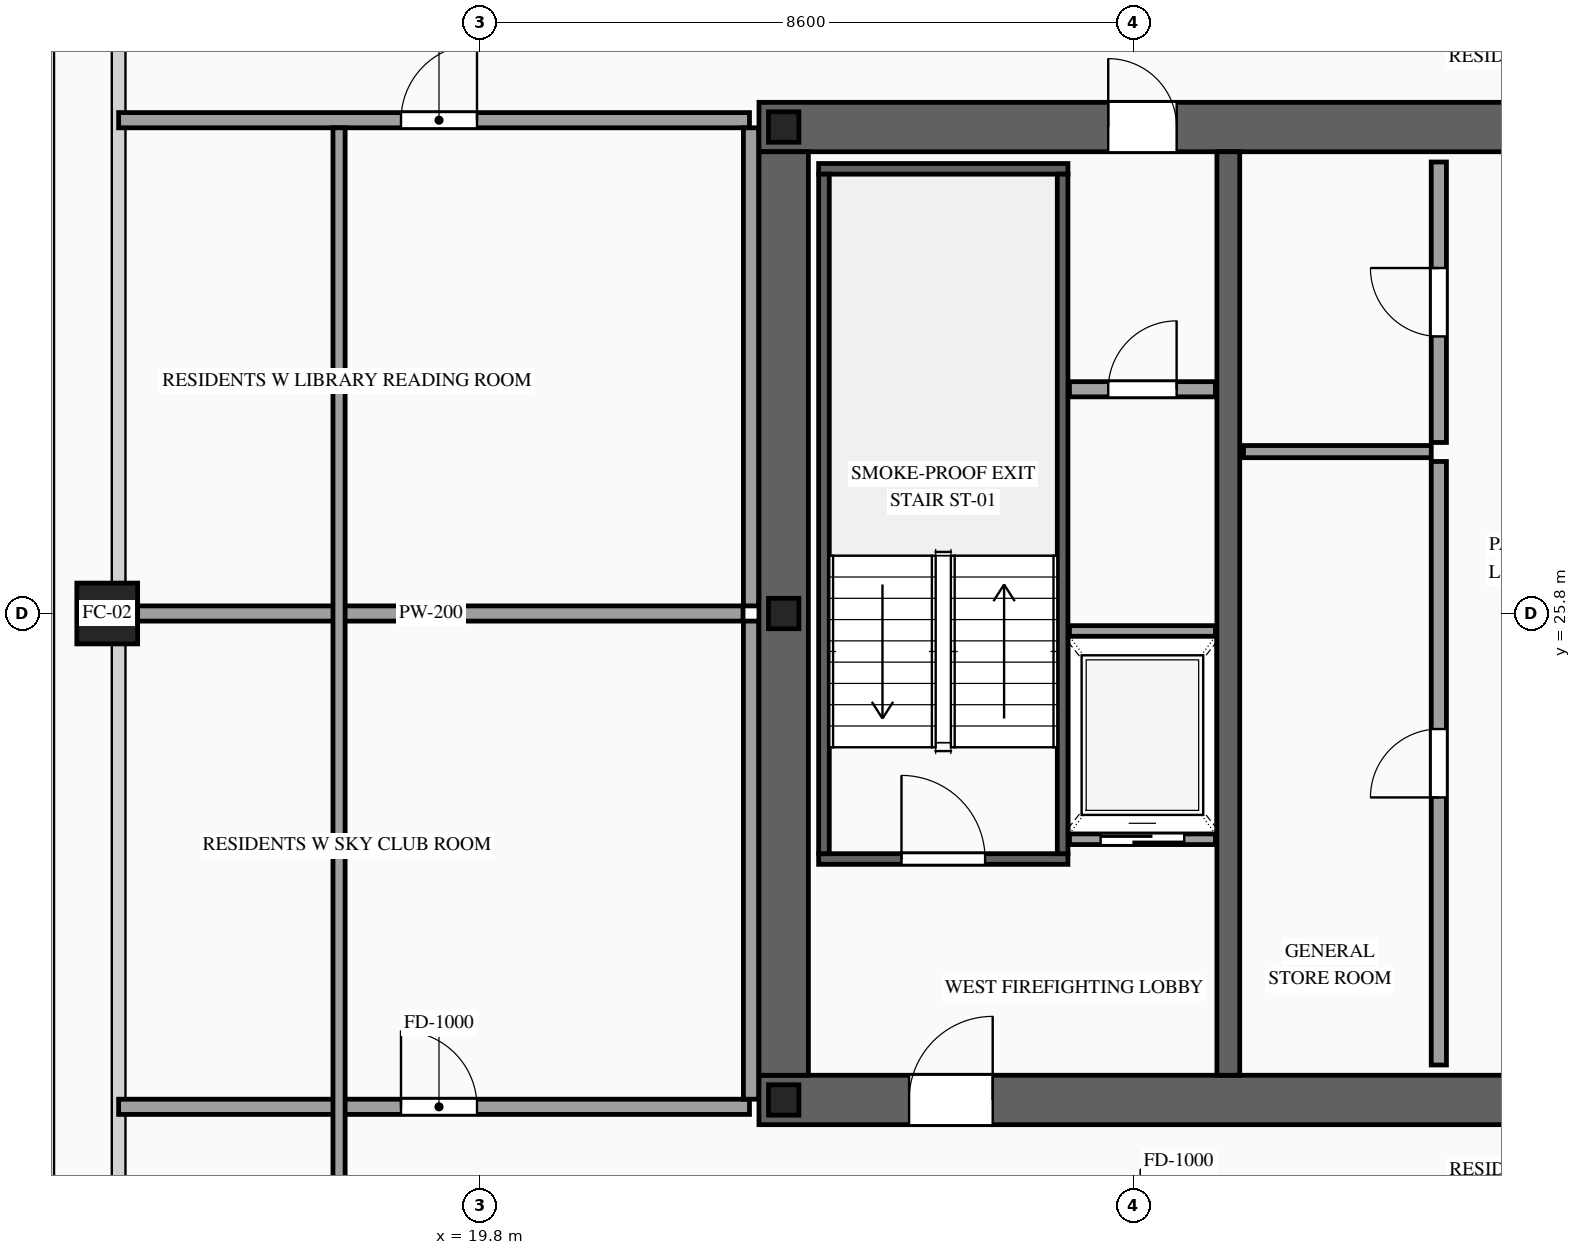
"""IFC4 building model, lengths in metres.
Left out: names, types, materials, properties, quantities, classifications, styles, units other than length and angle.
Written with IfcOpenShell. Run it as: python <this file> out.ifc"""

import sys

from ifc_helpers import new_model, si_unit, direction, frame, frame_2d, origin, origin_2d, place, context, subcontext, project, spatial, rectangle, hollow_rectangle, i_section, extrude, source, transform, mapped, element, fill, save


model = new_model("IFC4")
c1 = context("Model", 3, precision=1e-05, world=origin(), true_north=direction((0.0, 1.0)))
c2 = subcontext(c1, "Body", "Model", "MODEL_VIEW")
j1 = project(units=[si_unit("LENGTHUNIT", "METRE"), si_unit("PLANEANGLEUNIT", "RADIAN")], contexts=[c1])
p1 = place(None, origin())
s1 = spatial("IfcSite", under=j1, at=p1, CompositionType="ELEMENT")
p2 = place(p1, origin())
s2 = spatial("IfcBuilding", under=s1, at=p2, CompositionType="ELEMENT")
p3 = place(p2, frame((0.0, 0.0, 195.0)))
s3 = spatial("IfcBuildingStorey", under=s2, at=p3, CompositionType="ELEMENT", Elevation=195.0)
p4 = place(p3, frame((23.475, 19.4, 0.0), z_axis=(0.0, 0.0, 1.0), x_axis=(1.0, 0.0, 0.0)))
e1 = element("IfcWall", 1, at=p4, inside=s3, PredefinedType="SHEAR", context=c2, shape_type="SweptSolid", body=[
    extrude(rectangle(XDim=27.05, YDim=0.65, at=frame_2d((13.525, 0.0))), origin(), (0.0, 0.0, 1.0), 3.5),
])
p5 = place(p4, frame((1.975, 0.0, 0.0)))
e2 = element("IfcOpeningElement", 2, at=p5, cuts=e1, PredefinedType="OPENING", context=c2, shape_type="SweptSolid", body=[
    extrude(rectangle(XDim=1.1, YDim=2.2, at=frame_2d((0.55, 1.1))), frame((0.0, 0.34, 0.0), z_axis=(0.0, -1.0, 0.0), x_axis=(1.0, 0.0, 0.0)), (0.0, 0.0, 1.0), 0.68),
])
p6 = place(p4, frame((9.875, 0.0, 0.0)))
e3 = element("IfcOpeningElement", 3, at=p6, cuts=e1, PredefinedType="OPENING", context=c2, shape_type="SweptSolid", body=[
    extrude(rectangle(XDim=1.1, YDim=2.2, at=frame_2d((0.55, 1.1))), frame((0.0, 0.34, 0.0), z_axis=(0.0, -1.0, 0.0), x_axis=(1.0, 0.0, 0.0)), (0.0, 0.0, 1.0), 0.68),
])
p7 = place(p4, frame((23.075, 0.0, 0.0)))
e4 = element("IfcOpeningElement", 4, at=p7, cuts=e1, PredefinedType="OPENING", context=c2, shape_type="SweptSolid", body=[
    extrude(rectangle(XDim=1.1, YDim=2.2, at=frame_2d((0.55, 1.1))), frame((0.0, 0.34, 0.0), z_axis=(0.0, -1.0, 0.0), x_axis=(1.0, 0.0, 0.0)), (0.0, 0.0, 1.0), 0.68),
])
p8 = place(p4, frame((19.695, 0.0, 0.0)))
e5 = element("IfcOpeningElement", 5, at=p8, cuts=e1, PredefinedType="OPENING", context=c2, shape_type="SweptSolid", body=[
    extrude(rectangle(XDim=0.9, YDim=2.15, at=frame_2d((0.45, 1.075))), frame((0.0, 0.34, 0.0), z_axis=(0.0, -1.0, 0.0), x_axis=(1.0, 0.0, 0.0)), (0.0, 0.0, 1.0), 0.68),
])
p9 = place(p4, frame((18.255, 0.0, 0.0)))
e6 = element("IfcOpeningElement", 6, at=p9, cuts=e1, PredefinedType="OPENING", context=c2, shape_type="SweptSolid", body=[
    extrude(rectangle(XDim=0.9, YDim=2.15, at=frame_2d((0.45, 1.075))), frame((0.0, 0.34, 0.0), z_axis=(0.0, -1.0, 0.0), x_axis=(1.0, 0.0, 0.0)), (0.0, 0.0, 1.0), 0.68),
])
p10 = place(p3, frame((23.475, 32.2, 0.0), z_axis=(0.0, 0.0, 1.0), x_axis=(1.0, 0.0, 0.0)))
e7 = element("IfcWall", 7, at=p10, inside=s3, PredefinedType="SHEAR", context=c2, shape_type="SweptSolid", body=[
    extrude(rectangle(XDim=27.05, YDim=0.65, at=frame_2d((13.525, 0.0))), origin(), (0.0, 0.0, 1.0), 3.5),
])
p11 = place(p10, frame((4.595, 0.0, 0.0)))
e8 = element("IfcOpeningElement", 8, at=p11, cuts=e7, PredefinedType="OPENING", context=c2, shape_type="SweptSolid", body=[
    extrude(rectangle(XDim=0.9, YDim=2.15, at=frame_2d((0.45, 1.075))), frame((0.0, 0.34, 0.0), z_axis=(0.0, -1.0, 0.0), x_axis=(1.0, 0.0, 0.0)), (0.0, 0.0, 1.0), 0.68),
])
p12 = place(p10, frame((9.875, 0.0, 0.0)))
e9 = element("IfcOpeningElement", 9, at=p12, cuts=e7, PredefinedType="OPENING", context=c2, shape_type="SweptSolid", body=[
    extrude(rectangle(XDim=1.1, YDim=2.2, at=frame_2d((0.55, 1.1))), frame((0.0, 0.34, 0.0), z_axis=(0.0, -1.0, 0.0), x_axis=(1.0, 0.0, 0.0)), (0.0, 0.0, 1.0), 0.68),
])
p13 = place(p10, frame((15.725, 0.0, 0.0)))
e10 = element("IfcOpeningElement", 10, at=p13, cuts=e7, PredefinedType="OPENING", context=c2, shape_type="SweptSolid", body=[
    extrude(rectangle(XDim=1.1, YDim=2.2, at=frame_2d((0.55, 1.1))), frame((0.0, 0.34, 0.0), z_axis=(0.0, -1.0, 0.0), x_axis=(1.0, 0.0, 0.0)), (0.0, 0.0, 1.0), 0.68),
])
p14 = place(p10, frame((18.255, 0.0, 0.0)))
e11 = element("IfcOpeningElement", 11, at=p14, cuts=e7, PredefinedType="OPENING", context=c2, shape_type="SweptSolid", body=[
    extrude(rectangle(XDim=0.9, YDim=2.15, at=frame_2d((0.45, 1.075))), frame((0.0, 0.34, 0.0), z_axis=(0.0, -1.0, 0.0), x_axis=(1.0, 0.0, 0.0)), (0.0, 0.0, 1.0), 0.68),
])
p15 = place(p10, frame((19.695, 0.0, 0.0)))
e12 = element("IfcOpeningElement", 12, at=p15, cuts=e7, PredefinedType="OPENING", context=c2, shape_type="SweptSolid", body=[
    extrude(rectangle(XDim=0.9, YDim=2.15, at=frame_2d((0.45, 1.075))), frame((0.0, 0.34, 0.0), z_axis=(0.0, -1.0, 0.0), x_axis=(1.0, 0.0, 0.0)), (0.0, 0.0, 1.0), 0.68),
])
m1 = source(origin(), c2, "Body", "SweptSolid", [
    extrude(rectangle(XDim=12.15, YDim=0.65, at=frame_2d((6.075, 0.0))), origin(), (0.0, 0.0, 1.0), 3.5),
])
p16 = place(p3, frame((23.8, 19.725, 0.0), z_axis=(0.0, 0.0, 1.0), x_axis=(0.0, 1.0, 0.0)))
e13 = element("IfcWall", 13, at=p16, inside=s3, PredefinedType="SHEAR", context=c2, shape_type="MappedRepresentation", body=[
    mapped(m1, transform((0.0, 0.0, 0.0), scale=1.0)),
])
m2 = source(origin(), c2, "Body", "SweptSolid", [
    extrude(rectangle(XDim=12.15, YDim=0.3, at=frame_2d((6.075, 0.0))), origin(), (0.0, 0.0, 1.0), 3.5),
])
p17 = place(p3, frame((29.65, 19.725, 0.0), z_axis=(0.0, 0.0, 1.0), x_axis=(0.0, 1.0, 0.0)))
e14 = element("IfcWall", 14, at=p17, inside=s3, PredefinedType="SOLIDWALL", context=c2, shape_type="MappedRepresentation", body=[
    mapped(m2, transform((0.0, 0.0, 0.0), scale=1.0)),
])
m3 = source(origin(), c2, "Body", "SweptSolid", [
    extrude(i_section(OverallWidth=0.4, OverallDepth=0.4, WebThickness=0.013, FlangeThickness=0.021, at=origin_2d()), origin(), (0.0, 0.0, 1.0), 3.5),
])
for number, where, z_axis, x_axis in (
    (15, (23.8, 19.4, 0.0), (0.0, 0.0, 1.0), (1.0, 0.0, 0.0)),
    (16, (23.8, 25.8, 0.0), (0.0, 0.0, 1.0), (1.0, 0.0, 0.0)),
    (17, (23.8, 32.2, 0.0), (0.0, 0.0, 1.0), (1.0, 0.0, 0.0)),
):
    element("IfcColumn", number, at=place(p3, frame(where, z_axis=z_axis, x_axis=x_axis)), inside=s3, PredefinedType="COLUMN", context=c2, shape_type="MappedRepresentation", body=[
        mapped(m3, transform((0.0, 0.0, 0.0), scale=1.0)),
    ])
m4 = source(origin(), c2, "Body", "SweptSolid", [
    extrude(hollow_rectangle(XDim=0.8, YDim=0.8, WallThickness=0.036, at=origin_2d()), origin(), (0.0, 0.0, 1.0), 3.5),
])
p18 = place(p3, frame((14.9, 25.8, 0.0), z_axis=(0.0, 0.0, 1.0), x_axis=(1.0, 0.0, 0.0)))
e18 = element("IfcColumn", 18, at=p18, inside=s3, PredefinedType="COLUMN", context=c2, shape_type="MappedRepresentation", body=[
    mapped(m4, transform((0.0, 0.0, 0.0), scale=1.0)),
])
p19 = place(p3, frame((27.56, 22.83, 0.0), z_axis=(0.0, 0.0, 1.0), x_axis=(1.0, 0.0, 0.0)))
e19 = element("IfcWall", 19, at=p19, inside=s3, PredefinedType="SOLIDWALL", context=c2, shape_type="SweptSolid", body=[
    extrude(rectangle(XDim=1.92, YDim=0.14, at=frame_2d((0.96, 0.0))), origin(), (0.0, 0.0, 1.0), 3.28),
])
p20 = place(p19, frame((0.41, 0.0, 0.0)))
e20 = element("IfcOpeningElement", 20, at=p20, cuts=e19, PredefinedType="OPENING", context=c2, shape_type="SweptSolid", body=[
    extrude(rectangle(XDim=1.1, YDim=2.2, at=frame_2d((0.55, 1.1))), frame((0.0, 0.085, 0.0), z_axis=(0.0, -1.0, 0.0), x_axis=(1.0, 0.0, 0.0)), (0.0, 0.0, 1.0), 0.17),
])
m5 = source(origin(), c2, "Body", "SweptSolid", [
    extrude(rectangle(XDim=1.92, YDim=0.14, at=frame_2d((0.96, 0.0))), origin(), (0.0, 0.0, 1.0), 3.28),
])
p21 = place(p3, frame((27.56, 25.57, 0.0), z_axis=(0.0, 0.0, 1.0), x_axis=(1.0, 0.0, 0.0)))
e21 = element("IfcWall", 21, at=p21, inside=s3, PredefinedType="SOLIDWALL", context=c2, shape_type="MappedRepresentation", body=[
    mapped(m5, transform((0.0, 0.0, 0.0), scale=1.0)),
])
p22 = place(p3, frame((24.26, 22.57, 0.0), z_axis=(0.0, 0.0, 1.0), x_axis=(1.0, 0.0, 0.0)))
e22 = element("IfcWall", 22, at=p22, inside=s3, PredefinedType="SOLIDWALL", context=c2, shape_type="SweptSolid", body=[
    extrude(rectangle(XDim=3.28, YDim=0.14, at=frame_2d((1.64, 0.0))), origin(), (0.0, 0.0, 1.0), 3.28),
])
p23 = place(p22, frame((1.09, 0.0, 0.0)))
e23 = element("IfcOpeningElement", 23, at=p23, cuts=e22, PredefinedType="OPENING", context=c2, shape_type="SweptSolid", body=[
    extrude(rectangle(XDim=1.1, YDim=2.2, at=frame_2d((0.55, 1.1))), frame((0.0, 0.085, 0.0), z_axis=(0.0, -1.0, 0.0), x_axis=(1.0, 0.0, 0.0)), (0.0, 0.0, 1.0), 0.17),
])
m6 = source(origin(), c2, "Body", "SweptSolid", [
    extrude(rectangle(XDim=3.28, YDim=0.14, at=frame_2d((1.64, 0.0))), origin(), (0.0, 0.0, 1.0), 3.28),
])
p24 = place(p3, frame((24.26, 31.65, 0.0), z_axis=(0.0, 0.0, 1.0), x_axis=(1.0, 0.0, 0.0)))
e24 = element("IfcWall", 24, at=p24, inside=s3, PredefinedType="SOLIDWALL", context=c2, shape_type="MappedRepresentation", body=[
    mapped(m6, transform((0.0, 0.0, 0.0), scale=1.0)),
])
m7 = source(origin(), c2, "Body", "SweptSolid", [
    extrude(rectangle(XDim=8.94, YDim=0.14, at=frame_2d((4.47, 0.0))), origin(), (0.0, 0.0, 1.0), 3.28),
])
for number, where, z_axis, x_axis in (
    (25, (24.33, 22.64, 0.0), (0.0, 0.0, 1.0), (0.0, 1.0, 0.0)),
    (26, (27.47, 22.64, 0.0), (0.0, 0.0, 1.0), (0.0, 1.0, 0.0)),
):
    element("IfcWall", number, at=place(p3, frame(where, z_axis=z_axis, x_axis=x_axis)), inside=s3, PredefinedType="SOLIDWALL", context=c2, shape_type="MappedRepresentation", body=[
        mapped(m7, transform((0.0, 0.0, 0.0), scale=1.0)),
    ])
p25 = place(p3, frame((27.56, 28.75, 0.0), z_axis=(0.0, 0.0, 1.0), x_axis=(1.0, 0.0, 0.0)))
e27 = element("IfcWall", 27, at=p25, inside=s3, PredefinedType="PARTITIONING", context=c2, shape_type="SweptSolid", body=[
    extrude(rectangle(XDim=1.92, YDim=0.2, at=frame_2d((0.96, 0.0))), origin(), (0.0, 0.0, 1.0), 3.28),
])
p26 = place(p25, frame((0.51, 0.0, 0.0)))
e28 = element("IfcOpeningElement", 28, at=p26, cuts=e27, PredefinedType="OPENING", context=c2, shape_type="SweptSolid", body=[
    extrude(rectangle(XDim=0.9, YDim=2.15, at=frame_2d((0.45, 1.075))), frame((0.0, 0.115, 0.0), z_axis=(0.0, -1.0, 0.0), x_axis=(1.0, 0.0, 0.0)), (0.0, 0.0, 1.0), 0.23),
])
p27 = place(p3, frame((32.42, 19.86, 0.0), z_axis=(0.0, 0.0, 1.0), x_axis=(0.0, 1.0, 0.0)))
e29 = element("IfcWall", 29, at=p27, inside=s3, PredefinedType="PARTITIONING", context=c2, shape_type="SweptSolid", body=[
    extrude(rectangle(XDim=7.94, YDim=0.2, at=frame_2d((3.97, 0.0))), origin(), (0.0, 0.0, 1.0), 3.28),
])
p28 = place(p27, frame((3.52, 0.0, 0.0)))
e30 = element("IfcOpeningElement", 30, at=p28, cuts=e29, PredefinedType="OPENING", context=c2, shape_type="SweptSolid", body=[
    extrude(rectangle(XDim=0.9, YDim=2.15, at=frame_2d((0.45, 1.075))), frame((0.0, 0.115, 0.0), z_axis=(0.0, -1.0, 0.0), x_axis=(1.0, 0.0, 0.0)), (0.0, 0.0, 1.0), 0.23),
])
p29 = place(p3, frame((32.42, 28.05, 0.0), z_axis=(0.0, 0.0, 1.0), x_axis=(0.0, 1.0, 0.0)))
e31 = element("IfcWall", 31, at=p29, inside=s3, PredefinedType="PARTITIONING", context=c2, shape_type="SweptSolid", body=[
    extrude(rectangle(XDim=3.69, YDim=0.2, at=frame_2d((1.845, 0.0))), origin(), (0.0, 0.0, 1.0), 3.28),
])
p30 = place(p29, frame((1.395, 0.0, 0.0)))
e32 = element("IfcOpeningElement", 32, at=p30, cuts=e31, PredefinedType="OPENING", context=c2, shape_type="SweptSolid", body=[
    extrude(rectangle(XDim=0.9, YDim=2.15, at=frame_2d((0.45, 1.075))), frame((0.0, 0.115, 0.0), z_axis=(0.0, -1.0, 0.0), x_axis=(1.0, 0.0, 0.0)), (0.0, 0.0, 1.0), 0.23),
])
m8 = source(origin(), c2, "Body", "SweptSolid", [
    extrude(rectangle(XDim=2.47, YDim=0.16, at=frame_2d((1.235, 0.0))), origin(), (0.0, 0.0, 1.0), 3.28),
])
p31 = place(p3, frame((29.85, 27.93, 0.0), z_axis=(0.0, 0.0, 1.0), x_axis=(1.0, 0.0, 0.0)))
e33 = element("IfcWall", 33, at=p31, inside=s3, PredefinedType="PARTITIONING", context=c2, shape_type="MappedRepresentation", body=[
    mapped(m8, transform((0.0, 0.0, 0.0), scale=1.0)),
])
p32 = place(p3, frame((15.05, 19.31, 0.0), z_axis=(0.0, 0.0, 1.0), x_axis=(1.0, 0.0, 0.0)))
e34 = element("IfcWall", 34, at=p32, inside=s3, PredefinedType="PARTITIONING", context=c2, shape_type="SweptSolid", body=[
    extrude(rectangle(XDim=8.3, YDim=0.2, at=frame_2d((4.15, 0.0))), origin(), (0.0, 0.0, 1.0), 2.775),
])
p33 = place(p32, frame((3.715, 0.0, 0.0)))
e35 = element("IfcOpeningElement", 35, at=p33, cuts=e34, PredefinedType="OPENING", context=c2, shape_type="SweptSolid", body=[
    extrude(rectangle(XDim=1.0, YDim=2.2, at=frame_2d((0.5, 1.1))), frame((0.0, 0.115, 0.0), z_axis=(0.0, -1.0, 0.0), x_axis=(1.0, 0.0, 0.0)), (0.0, 0.0, 1.0), 0.23),
])
m9 = source(origin(), c2, "Body", "SweptSolid", [
    extrude(rectangle(XDim=8.215, YDim=0.2, at=frame_2d((4.107, 0.0))), origin(), (0.0, 0.0, 1.0), 2.687),
])
p34 = place(p3, frame((15.05, 25.8, 0.0), z_axis=(0.0, 0.0, 1.0), x_axis=(1.0, 0.0, 0.0)))
e36 = element("IfcWall", 36, at=p34, inside=s3, PredefinedType="PARTITIONING", context=c2, shape_type="MappedRepresentation", body=[
    mapped(m9, transform((0.0, 0.0, 0.0), scale=1.0)),
])
m10 = source(origin(), c2, "Body", "SweptSolid", [
    extrude(rectangle(XDim=6.29, YDim=0.2, at=frame_2d((3.145, 0.0))), origin(), (0.0, 0.0, 1.0), 3.28),
])
p35 = place(p3, frame((23.37, 19.41, 0.0), z_axis=(0.0, 0.0, 1.0), x_axis=(0.0, 1.0, 0.0)))
e37 = element("IfcWall", 37, at=p35, inside=s3, PredefinedType="PARTITIONING", context=c2, shape_type="MappedRepresentation", body=[
    mapped(m10, transform((0.0, 0.0, 0.0), scale=1.0)),
])
p36 = place(p3, frame((15.05, 32.29, 0.0), z_axis=(0.0, 0.0, 1.0), x_axis=(1.0, 0.0, 0.0)))
e38 = element("IfcWall", 38, at=p36, inside=s3, PredefinedType="PARTITIONING", context=c2, shape_type="SweptSolid", body=[
    extrude(rectangle(XDim=8.3, YDim=0.2, at=frame_2d((4.15, 0.0))), origin(), (0.0, 0.0, 1.0), 2.775),
])
p37 = place(p36, frame((3.715, 0.0, 0.0)))
e39 = element("IfcOpeningElement", 39, at=p37, cuts=e38, PredefinedType="OPENING", context=c2, shape_type="SweptSolid", body=[
    extrude(rectangle(XDim=1.0, YDim=2.2, at=frame_2d((0.5, 1.1))), frame((0.0, 0.115, 0.0), z_axis=(0.0, -1.0, 0.0), x_axis=(1.0, 0.0, 0.0)), (0.0, 0.0, 1.0), 0.23),
])
m11 = source(origin(), c2, "Body", "SweptSolid", [
    extrude(rectangle(XDim=28.19, YDim=0.16, at=frame_2d((14.095, 0.0))), origin(), (0.0, 0.0, 1.0), 3.28),
])
p38 = place(p3, frame((17.95, 4.0, 0.0), z_axis=(0.0, 0.0, 1.0), x_axis=(0.0, 1.0, 0.0)))
e40 = element("IfcWall", 40, at=p38, inside=s3, PredefinedType="PARTITIONING", context=c2, shape_type="MappedRepresentation", body=[
    mapped(m11, transform((0.0, 0.0, 0.0), scale=1.0)),
])
p39 = place(p3, frame((23.37, 25.9, 0.0), z_axis=(0.0, 0.0, 1.0), x_axis=(0.0, 1.0, 0.0)))
e41 = element("IfcWall", 41, at=p39, inside=s3, PredefinedType="PARTITIONING", context=c2, shape_type="MappedRepresentation", body=[
    mapped(m10, transform((0.0, 0.0, 0.0), scale=1.0)),
])
m12 = source(origin(), c2, "Body", "SweptSolid", [
    extrude(rectangle(XDim=1.1, YDim=2.2, at=frame_2d((0.55, 1.1))), frame((0.0, 0.025, 0.0), z_axis=(0.0, -1.0, 0.0), x_axis=(1.0, 0.0, 0.0)), (0.0, 0.0, 1.0), 0.05),
])
p40 = place(p20, origin())
e42 = element("IfcDoor", 42, at=p40, inside=s3, OperationType="SLIDING_TO_LEFT", PredefinedType="DOOR", context=c2, shape_type="MappedRepresentation", body=[
    mapped(m12, transform((0.0, 0.0, 0.0), scale=1.0)),
])
fill(e20, e42)
m13 = source(origin(), c2, "Body", "SweptSolid", [
    extrude(rectangle(XDim=1.1, YDim=2.2, at=frame_2d((0.55, 1.1))), frame((0.0, 0.025, 0.0), z_axis=(0.0, -1.0, 0.0), x_axis=(1.0, 0.0, 0.0)), (0.0, 0.0, 1.0), 0.05),
])
p41 = place(p23, origin())
e43 = element("IfcDoor", 43, at=p41, inside=s3, OperationType="SINGLE_SWING_LEFT", PredefinedType="DOOR", context=c2, shape_type="MappedRepresentation", body=[
    mapped(m13, transform((0.0, 0.0, 0.0), scale=1.0)),
])
fill(e23, e43)
p42 = place(p5, origin())
e44 = element("IfcDoor", 44, at=p42, inside=s3, OperationType="SINGLE_SWING_RIGHT", PredefinedType="DOOR", context=c2, shape_type="MappedRepresentation", body=[
    mapped(m13, transform((0.0, 0.0, 0.0), scale=1.0)),
])
fill(e2, e44)
m14 = source(origin(), c2, "Body", "SweptSolid", [
    extrude(rectangle(XDim=0.9, YDim=2.15, at=frame_2d((0.45, 1.075))), frame((0.0, 0.025, 0.0), z_axis=(0.0, -1.0, 0.0), x_axis=(1.0, 0.0, 0.0)), (0.0, 0.0, 1.0), 0.05),
])
p43 = place(p11, origin())
e45 = element("IfcDoor", 45, at=p43, inside=s3, OperationType="SINGLE_SWING_LEFT", PredefinedType="DOOR", context=c2, shape_type="MappedRepresentation", body=[
    mapped(m14, transform((0.0, 0.0, 0.0), scale=1.0)),
])
fill(e8, e45)
p44 = place(p26, origin())
e46 = element("IfcDoor", 46, at=p44, inside=s3, OperationType="SINGLE_SWING_RIGHT", PredefinedType="DOOR", context=c2, shape_type="MappedRepresentation", body=[
    mapped(m14, transform((0.0, 0.0, 0.0), scale=1.0)),
])
fill(e28, e46)
p45 = place(p28, origin())
e47 = element("IfcDoor", 47, at=p45, inside=s3, OperationType="SINGLE_SWING_LEFT", PredefinedType="DOOR", context=c2, shape_type="MappedRepresentation", body=[
    mapped(m14, transform((0.0, 0.0, 0.0), scale=1.0)),
])
fill(e30, e47)
p46 = place(p30, origin())
e48 = element("IfcDoor", 48, at=p46, inside=s3, OperationType="SINGLE_SWING_RIGHT", PredefinedType="DOOR", context=c2, shape_type="MappedRepresentation", body=[
    mapped(m14, transform((0.0, 0.0, 0.0), scale=1.0)),
])
fill(e32, e48)
m15 = source(origin(), c2, "Body", "SweptSolid", [
    extrude(rectangle(XDim=1.0, YDim=2.2, at=frame_2d((0.5, 1.1))), frame((0.0, 0.025, 0.0), z_axis=(0.0, -1.0, 0.0), x_axis=(1.0, 0.0, 0.0)), (0.0, 0.0, 1.0), 0.05),
])
p47 = place(p33, origin())
e49 = element("IfcDoor", 49, at=p47, inside=s3, OperationType="SINGLE_SWING_LEFT", PredefinedType="DOOR", context=c2, shape_type="MappedRepresentation", body=[
    mapped(m15, transform((0.0, 0.0, 0.0), scale=1.0)),
])
fill(e35, e49)
p48 = place(p37, origin())
e50 = element("IfcDoor", 50, at=p48, inside=s3, OperationType="SINGLE_SWING_RIGHT", PredefinedType="DOOR", context=c2, shape_type="MappedRepresentation", body=[
    mapped(m15, transform((0.0, 0.0, 0.0), scale=1.0)),
])
fill(e39, e50)
save(model, sys.argv[1])
